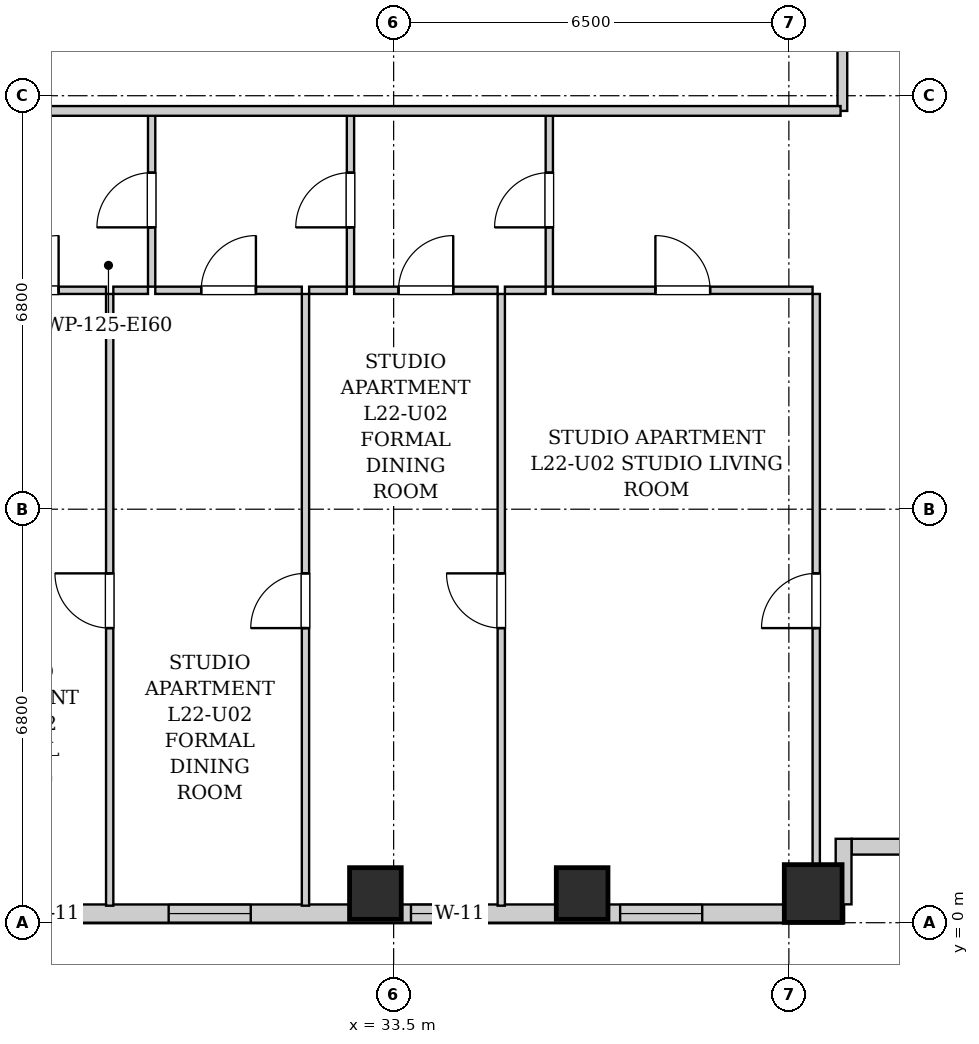
"""IFC4 building model, lengths in metres.
Left out: names, types, materials, properties, quantities, classifications, styles, units other than length and angle.
Written with IfcOpenShell. Run it as: python <this file> out.ifc"""

import sys

from ifc_helpers import new_model, si_unit, direction, frame, frame_2d, origin, origin_2d, place, context, subcontext, project, spatial, rectangle, extrude, element, fill, save


model = new_model("IFC4")
c1 = context("Model", 3, precision=1e-05, world=origin(), true_north=direction((0.0, 1.0)))
c2 = subcontext(c1, "Body", "Model", "MODEL_VIEW")
j1 = project(units=[si_unit("LENGTHUNIT", "METRE"), si_unit("PLANEANGLEUNIT", "RADIAN")], contexts=[c1])
p1 = place(None, origin())
s1 = spatial("IfcSite", under=j1, at=p1, CompositionType="ELEMENT")
p2 = place(p1, origin())
s2 = spatial("IfcBuilding", under=s1, at=p2, CompositionType="ELEMENT")
p3 = place(p2, frame((0.0, 0.0, 81.5)))
s3 = spatial("IfcBuildingStorey", under=s2, at=p3, CompositionType="ELEMENT", Elevation=81.5)
for number, where, z_axis, x_axis in (
    (1, (33.2, 0.48, 0.0), (0.0, 0.0, 1.0), (1.0, 0.0, 0.0)),
    (2, (36.6, 0.48, 0.0), (0.0, 0.0, 1.0), (1.0, 0.0, 0.0)),
):
    element("IfcColumn", number, at=place(p3, frame(where, z_axis=z_axis, x_axis=x_axis)), inside=s3, PredefinedType="COLUMN", context=c2, shape_type="SweptSolid", body=[
        extrude(rectangle(XDim=0.85, YDim=0.85, at=origin_2d()), origin(), (0.0, 0.0, 1.0), 3.2),
    ])
p4 = place(p3, frame((40.4, 0.48, 0.0), z_axis=(0.0, 0.0, 1.0), x_axis=(1.0, 0.0, 0.0)))
e3 = element("IfcColumn", 3, at=p4, inside=s3, PredefinedType="COLUMN", context=c2, shape_type="SweptSolid", body=[
    extrude(rectangle(XDim=0.95, YDim=0.95, at=origin_2d()), origin(), (0.0, 0.0, 1.0), 3.2),
])
p5 = place(p3, frame((40.9, 0.15, 0.0), z_axis=(0.0, 0.0, 1.0), x_axis=(-1.0, 0.0, 0.0)))
e4 = element("IfcWall", 4, at=p5, inside=s3, PredefinedType="SOLIDWALL", context=c2, shape_type="SweptSolid", body=[
    extrude(rectangle(XDim=22.5, YDim=0.3, at=frame_2d((11.25, 0.0))), origin(), (0.0, 0.0, 1.0), 2.94),
])
p6 = place(p5, frame((19.425, 0.0, 0.55)))
e5 = element("IfcOpeningElement", 5, at=p6, cuts=e4, PredefinedType="OPENING", context=c2, shape_type="SweptSolid", body=[
    extrude(rectangle(XDim=1.35, YDim=1.2, at=frame_2d((0.675, 0.6))), frame((0.0, 0.16, 0.0), z_axis=(0.0, -1.0, 0.0), x_axis=(1.0, 0.0, 0.0)), (0.0, 0.0, 1.0), 0.32),
])
p7 = place(p5, frame((12.55, 0.0, 0.55)))
e6 = element("IfcOpeningElement", 6, at=p7, cuts=e4, PredefinedType="OPENING", context=c2, shape_type="SweptSolid", body=[
    extrude(rectangle(XDim=0.85, YDim=1.2, at=frame_2d((0.425, 0.6))), frame((0.0, 0.16, 0.0), z_axis=(0.0, -1.0, 0.0), x_axis=(1.0, 0.0, 0.0)), (0.0, 0.0, 1.0), 0.32),
])
p8 = place(p5, frame((9.75, 0.0, 0.55)))
e7 = element("IfcOpeningElement", 7, at=p8, cuts=e4, PredefinedType="OPENING", context=c2, shape_type="SweptSolid", body=[
    extrude(rectangle(XDim=1.35, YDim=1.2, at=frame_2d((0.675, 0.6))), frame((0.0, 0.16, 0.0), z_axis=(0.0, -1.0, 0.0), x_axis=(1.0, 0.0, 0.0)), (0.0, 0.0, 1.0), 0.32),
])
p9 = place(p5, frame((6.265, 0.0, 0.55)))
e8 = element("IfcOpeningElement", 8, at=p9, cuts=e4, PredefinedType="OPENING", context=c2, shape_type="SweptSolid", body=[
    extrude(rectangle(XDim=0.85, YDim=1.2, at=frame_2d((0.425, 0.6))), frame((0.0, 0.16, 0.0), z_axis=(0.0, -1.0, 0.0), x_axis=(1.0, 0.0, 0.0)), (0.0, 0.0, 1.0), 0.32),
])
p10 = place(p5, frame((2.325, 0.0, 0.55)))
e9 = element("IfcOpeningElement", 9, at=p10, cuts=e4, PredefinedType="OPENING", context=c2, shape_type="SweptSolid", body=[
    extrude(rectangle(XDim=1.35, YDim=1.2, at=frame_2d((0.675, 0.6))), frame((0.0, 0.16, 0.0), z_axis=(0.0, -1.0, 0.0), x_axis=(1.0, 0.0, 0.0)), (0.0, 0.0, 1.0), 0.32),
])
p11 = place(p3, frame((42.018, 1.25, 0.0), z_axis=(0.0, 0.0, 1.0), x_axis=(-1.0, 0.0, 0.0)))
e10 = element("IfcWall", 10, at=p11, inside=s3, PredefinedType="SOLIDWALL", context=c2, shape_type="SweptSolid", body=[
    extrude(rectangle(XDim=0.986, YDim=0.26, at=frame_2d((0.493, 0.0))), origin(), (0.0, 0.0, 1.0), 2.94),
])
p12 = place(p3, frame((40.9, 1.38, 0.0), z_axis=(0.0, 0.0, 1.0), x_axis=(0.0, -1.0, 0.0)))
e11 = element("IfcWall", 11, at=p12, inside=s3, PredefinedType="SOLIDWALL", context=c2, shape_type="SweptSolid", body=[
    extrude(rectangle(XDim=1.078, YDim=0.26, at=frame_2d((0.539, 0.0))), origin(), (0.0, 0.0, 1.0), 2.94),
])
p13 = place(p3, frame((40.88, 13.35, 0.0), z_axis=(0.0, 0.0, 1.0), x_axis=(0.0, 1.0, 0.0)))
e12 = element("IfcWall", 12, at=p13, inside=s3, PredefinedType="PARTITIONING", context=c2, shape_type="SweptSolid", body=[
    extrude(rectangle(XDim=1.74, YDim=0.16, at=frame_2d((0.87, 0.0))), origin(), (0.0, 0.0, 1.0), 2.94),
])
p14 = place(p3, frame((29.52, 10.46, 0.0), z_axis=(0.0, 0.0, 1.0), x_axis=(0.0, 1.0, 0.0)))
e13 = element("IfcWall", 13, at=p14, inside=s3, PredefinedType="PARTITIONING", context=c2, shape_type="SweptSolid", body=[
    extrude(rectangle(XDim=2.85, YDim=0.12, at=frame_2d((1.425, 0.0))), origin(), (0.0, 0.0, 1.0), 2.94),
])
p15 = place(p14, frame((0.975, 0.0, 0.0)))
e14 = element("IfcOpeningElement", 14, at=p15, cuts=e13, PredefinedType="OPENING", context=c2, shape_type="SweptSolid", body=[
    extrude(rectangle(XDim=0.9, YDim=2.05, at=frame_2d((0.45, 1.025))), frame((0.0, 0.07, 0.0), z_axis=(0.0, -1.0, 0.0), x_axis=(1.0, 0.0, 0.0)), (0.0, 0.0, 1.0), 0.14),
])
p16 = place(p3, frame((26.31, 10.4, 0.0), z_axis=(0.0, 0.0, 1.0), x_axis=(1.0, 0.0, 0.0)))
e15 = element("IfcWall", 15, at=p16, inside=s3, PredefinedType="PARTITIONING", context=c2, shape_type="SweptSolid", body=[
    extrude(rectangle(XDim=2.46, YDim=0.12, at=frame_2d((1.23, 0.0))), origin(), (0.0, 0.0, 1.0), 2.94),
])
p17 = place(p16, frame((0.78, 0.0, 0.0)))
e16 = element("IfcOpeningElement", 16, at=p17, cuts=e15, PredefinedType="OPENING", context=c2, shape_type="SweptSolid", body=[
    extrude(rectangle(XDim=0.9, YDim=2.05, at=frame_2d((0.45, 1.025))), frame((0.0, 0.07, 0.0), z_axis=(0.0, -1.0, 0.0), x_axis=(1.0, 0.0, 0.0)), (0.0, 0.0, 1.0), 0.14),
])
p18 = place(p3, frame((28.89, 10.4, 0.0), z_axis=(0.0, 0.0, 1.0), x_axis=(1.0, 0.0, 0.0)))
e17 = element("IfcWall", 17, at=p18, inside=s3, PredefinedType="PARTITIONING", context=c2, shape_type="SweptSolid", body=[
    extrude(rectangle(XDim=0.57, YDim=0.12, at=frame_2d((0.285, 0.0))), origin(), (0.0, 0.0, 1.0), 2.94),
])
p19 = place(p3, frame((32.79, 10.46, 0.0), z_axis=(0.0, 0.0, 1.0), x_axis=(0.0, 1.0, 0.0)))
e18 = element("IfcWall", 18, at=p19, inside=s3, PredefinedType="PARTITIONING", context=c2, shape_type="SweptSolid", body=[
    extrude(rectangle(XDim=2.85, YDim=0.12, at=frame_2d((1.425, 0.0))), origin(), (0.0, 0.0, 1.0), 2.94),
])
p20 = place(p19, frame((0.975, 0.0, 0.0)))
e19 = element("IfcOpeningElement", 19, at=p20, cuts=e18, PredefinedType="OPENING", context=c2, shape_type="SweptSolid", body=[
    extrude(rectangle(XDim=0.9, YDim=2.05, at=frame_2d((0.45, 1.025))), frame((0.0, 0.07, 0.0), z_axis=(0.0, -1.0, 0.0), x_axis=(1.0, 0.0, 0.0)), (0.0, 0.0, 1.0), 0.14),
])
p21 = place(p3, frame((29.58, 10.4, 0.0), z_axis=(0.0, 0.0, 1.0), x_axis=(1.0, 0.0, 0.0)))
e20 = element("IfcWall", 20, at=p21, inside=s3, PredefinedType="PARTITIONING", context=c2, shape_type="SweptSolid", body=[
    extrude(rectangle(XDim=2.41, YDim=0.12, at=frame_2d((1.205, 0.0))), origin(), (0.0, 0.0, 1.0), 2.94),
])
p22 = place(p21, frame((0.755, 0.0, 0.0)))
e21 = element("IfcOpeningElement", 21, at=p22, cuts=e20, PredefinedType="OPENING", context=c2, shape_type="SweptSolid", body=[
    extrude(rectangle(XDim=0.9, YDim=2.05, at=frame_2d((0.45, 1.025))), frame((0.0, 0.07, 0.0), z_axis=(0.0, -1.0, 0.0), x_axis=(1.0, 0.0, 0.0)), (0.0, 0.0, 1.0), 0.14),
])
p23 = place(p3, frame((32.11, 10.4, 0.0), z_axis=(0.0, 0.0, 1.0), x_axis=(1.0, 0.0, 0.0)))
e22 = element("IfcWall", 22, at=p23, inside=s3, PredefinedType="PARTITIONING", context=c2, shape_type="SweptSolid", body=[
    extrude(rectangle(XDim=0.62, YDim=0.12, at=frame_2d((0.31, 0.0))), origin(), (0.0, 0.0, 1.0), 2.94),
])
p24 = place(p3, frame((36.06, 10.46, 0.0), z_axis=(0.0, 0.0, 1.0), x_axis=(0.0, 1.0, 0.0)))
e23 = element("IfcWall", 23, at=p24, inside=s3, PredefinedType="PARTITIONING", context=c2, shape_type="SweptSolid", body=[
    extrude(rectangle(XDim=2.85, YDim=0.12, at=frame_2d((1.425, 0.0))), origin(), (0.0, 0.0, 1.0), 2.94),
])
p25 = place(p24, frame((0.975, 0.0, 0.0)))
e24 = element("IfcOpeningElement", 24, at=p25, cuts=e23, PredefinedType="OPENING", context=c2, shape_type="SweptSolid", body=[
    extrude(rectangle(XDim=0.9, YDim=2.05, at=frame_2d((0.45, 1.025))), frame((0.0, 0.07, 0.0), z_axis=(0.0, -1.0, 0.0), x_axis=(1.0, 0.0, 0.0)), (0.0, 0.0, 1.0), 0.14),
])
p26 = place(p3, frame((32.85, 10.4, 0.0), z_axis=(0.0, 0.0, 1.0), x_axis=(1.0, 0.0, 0.0)))
e25 = element("IfcWall", 25, at=p26, inside=s3, PredefinedType="PARTITIONING", context=c2, shape_type="SweptSolid", body=[
    extrude(rectangle(XDim=2.36, YDim=0.12, at=frame_2d((1.18, 0.0))), origin(), (0.0, 0.0, 1.0), 2.94),
])
p27 = place(p26, frame((0.73, 0.0, 0.0)))
e26 = element("IfcOpeningElement", 26, at=p27, cuts=e25, PredefinedType="OPENING", context=c2, shape_type="SweptSolid", body=[
    extrude(rectangle(XDim=0.9, YDim=2.05, at=frame_2d((0.45, 1.025))), frame((0.0, 0.07, 0.0), z_axis=(0.0, -1.0, 0.0), x_axis=(1.0, 0.0, 0.0)), (0.0, 0.0, 1.0), 0.14),
])
p28 = place(p3, frame((35.33, 10.4, 0.0), z_axis=(0.0, 0.0, 1.0), x_axis=(1.0, 0.0, 0.0)))
e27 = element("IfcWall", 27, at=p28, inside=s3, PredefinedType="PARTITIONING", context=c2, shape_type="SweptSolid", body=[
    extrude(rectangle(XDim=0.67, YDim=0.12, at=frame_2d((0.335, 0.0))), origin(), (0.0, 0.0, 1.0), 2.94),
])
p29 = place(p3, frame((36.12, 10.4, 0.0), z_axis=(0.0, 0.0, 1.0), x_axis=(1.0, 0.0, 0.0)))
e28 = element("IfcWall", 28, at=p29, inside=s3, PredefinedType="PARTITIONING", context=c2, shape_type="SweptSolid", body=[
    extrude(rectangle(XDim=4.27, YDim=0.12, at=frame_2d((2.135, 0.0))), origin(), (0.0, 0.0, 1.0), 2.94),
])
p30 = place(p29, frame((1.685, 0.0, 0.0)))
e29 = element("IfcOpeningElement", 29, at=p30, cuts=e28, PredefinedType="OPENING", context=c2, shape_type="SweptSolid", body=[
    extrude(rectangle(XDim=0.9, YDim=2.05, at=frame_2d((0.45, 1.025))), frame((0.0, 0.07, 0.0), z_axis=(0.0, -1.0, 0.0), x_axis=(1.0, 0.0, 0.0)), (0.0, 0.0, 1.0), 0.14),
])
p31 = place(p3, frame((28.83, 0.28, 0.0), z_axis=(0.0, 0.0, 1.0), x_axis=(0.0, 1.0, 0.0)))
e30 = element("IfcWall", 30, at=p31, inside=s3, PredefinedType="PARTITIONING", context=c2, shape_type="SweptSolid", body=[
    extrude(rectangle(XDim=10.06, YDim=0.12, at=frame_2d((5.03, 0.0))), origin(), (0.0, 0.0, 1.0), 2.94),
])
p32 = place(p31, frame((4.565, 0.0, 0.0)))
e31 = element("IfcOpeningElement", 31, at=p32, cuts=e30, PredefinedType="OPENING", context=c2, shape_type="SweptSolid", body=[
    extrude(rectangle(XDim=0.9, YDim=2.05, at=frame_2d((0.45, 1.025))), frame((0.0, 0.07, 0.0), z_axis=(0.0, -1.0, 0.0), x_axis=(1.0, 0.0, 0.0)), (0.0, 0.0, 1.0), 0.14),
])
p33 = place(p3, frame((32.05, 0.28, 0.0), z_axis=(0.0, 0.0, 1.0), x_axis=(0.0, 1.0, 0.0)))
e32 = element("IfcWall", 32, at=p33, inside=s3, PredefinedType="PARTITIONING", context=c2, shape_type="SweptSolid", body=[
    extrude(rectangle(XDim=10.06, YDim=0.12, at=frame_2d((5.03, 0.0))), origin(), (0.0, 0.0, 1.0), 2.94),
])
p34 = place(p33, frame((4.565, 0.0, 0.0)))
e33 = element("IfcOpeningElement", 33, at=p34, cuts=e32, PredefinedType="OPENING", context=c2, shape_type="SweptSolid", body=[
    extrude(rectangle(XDim=0.9, YDim=2.05, at=frame_2d((0.45, 1.025))), frame((0.0, 0.07, 0.0), z_axis=(0.0, -1.0, 0.0), x_axis=(1.0, 0.0, 0.0)), (0.0, 0.0, 1.0), 0.14),
])
p35 = place(p3, frame((35.27, 0.28, 0.0), z_axis=(0.0, 0.0, 1.0), x_axis=(0.0, 1.0, 0.0)))
e34 = element("IfcWall", 34, at=p35, inside=s3, PredefinedType="PARTITIONING", context=c2, shape_type="SweptSolid", body=[
    extrude(rectangle(XDim=10.06, YDim=0.12, at=frame_2d((5.03, 0.0))), origin(), (0.0, 0.0, 1.0), 2.94),
])
p36 = place(p35, frame((4.565, 0.0, 0.0)))
e35 = element("IfcOpeningElement", 35, at=p36, cuts=e34, PredefinedType="OPENING", context=c2, shape_type="SweptSolid", body=[
    extrude(rectangle(XDim=0.9, YDim=2.05, at=frame_2d((0.45, 1.025))), frame((0.0, 0.07, 0.0), z_axis=(0.0, -1.0, 0.0), x_axis=(1.0, 0.0, 0.0)), (0.0, 0.0, 1.0), 0.14),
])
p37 = place(p3, frame((40.45, 0.28, 0.0), z_axis=(0.0, 0.0, 1.0), x_axis=(0.0, 1.0, 0.0)))
e36 = element("IfcWall", 36, at=p37, inside=s3, PredefinedType="PARTITIONING", context=c2, shape_type="SweptSolid", body=[
    extrude(rectangle(XDim=10.06, YDim=0.12, at=frame_2d((5.03, 0.0))), origin(), (0.0, 0.0, 1.0), 2.94),
])
p38 = place(p37, frame((4.565, 0.0, 0.0)))
e37 = element("IfcOpeningElement", 37, at=p38, cuts=e36, PredefinedType="OPENING", context=c2, shape_type="SweptSolid", body=[
    extrude(rectangle(XDim=0.9, YDim=2.05, at=frame_2d((0.45, 1.025))), frame((0.0, 0.07, 0.0), z_axis=(0.0, -1.0, 0.0), x_axis=(1.0, 0.0, 0.0)), (0.0, 0.0, 1.0), 0.14),
])
p39 = place(p3, frame((10.05, 13.35, 0.0), z_axis=(0.0, 0.0, 1.0), x_axis=(1.0, 0.0, 0.0)))
e38 = element("IfcWall", 38, at=p39, inside=s3, PredefinedType="PARTITIONING", context=c2, shape_type="SweptSolid", body=[
    extrude(rectangle(XDim=30.8, YDim=0.16, at=frame_2d((15.4, 0.0))), origin(), (0.0, 0.0, 1.0), 2.94),
])
p40 = place(p39, frame((3.8, 0.0, 0.0)))
e39 = element("IfcOpeningElement", 39, at=p40, cuts=e38, PredefinedType="OPENING", context=c2, shape_type="SweptSolid", body=[
    extrude(rectangle(XDim=0.95, YDim=2.1, at=frame_2d((0.475, 1.05))), frame((0.0, 0.09, 0.0), z_axis=(0.0, -1.0, 0.0), x_axis=(1.0, 0.0, 0.0)), (0.0, 0.0, 1.0), 0.18),
])
p41 = place(p39, frame((13.445, 0.0, 0.0)))
e40 = element("IfcOpeningElement", 40, at=p41, cuts=e38, PredefinedType="OPENING", context=c2, shape_type="SweptSolid", body=[
    extrude(rectangle(XDim=0.95, YDim=2.1, at=frame_2d((0.475, 1.05))), frame((0.0, 0.09, 0.0), z_axis=(0.0, -1.0, 0.0), x_axis=(1.0, 0.0, 0.0)), (0.0, 0.0, 1.0), 0.18),
])
p42 = place(p15, origin())
e41 = element("IfcDoor", 41, at=p42, inside=s3, OperationType="SINGLE_SWING_LEFT", PredefinedType="DOOR", context=c2, shape_type="SweptSolid", body=[
    extrude(rectangle(XDim=0.9, YDim=2.05, at=frame_2d((0.45, 1.025))), frame((0.0, 0.025, 0.0), z_axis=(0.0, -1.0, 0.0), x_axis=(1.0, 0.0, 0.0)), (0.0, 0.0, 1.0), 0.05),
])
fill(e14, e41)
p43 = place(p17, origin())
e42 = element("IfcDoor", 42, at=p43, inside=s3, OperationType="SINGLE_SWING_RIGHT", PredefinedType="DOOR", context=c2, shape_type="SweptSolid", body=[
    extrude(rectangle(XDim=0.9, YDim=2.05, at=frame_2d((0.45, 1.025))), frame((0.0, 0.025, 0.0), z_axis=(0.0, -1.0, 0.0), x_axis=(1.0, 0.0, 0.0)), (0.0, 0.0, 1.0), 0.05),
])
fill(e16, e42)
p44 = place(p20, origin())
e43 = element("IfcDoor", 43, at=p44, inside=s3, OperationType="SINGLE_SWING_LEFT", PredefinedType="DOOR", context=c2, shape_type="SweptSolid", body=[
    extrude(rectangle(XDim=0.9, YDim=2.05, at=frame_2d((0.45, 1.025))), frame((0.0, 0.025, 0.0), z_axis=(0.0, -1.0, 0.0), x_axis=(1.0, 0.0, 0.0)), (0.0, 0.0, 1.0), 0.05),
])
fill(e19, e43)
p45 = place(p22, origin())
e44 = element("IfcDoor", 44, at=p45, inside=s3, OperationType="SINGLE_SWING_RIGHT", PredefinedType="DOOR", context=c2, shape_type="SweptSolid", body=[
    extrude(rectangle(XDim=0.9, YDim=2.05, at=frame_2d((0.45, 1.025))), frame((0.0, 0.025, 0.0), z_axis=(0.0, -1.0, 0.0), x_axis=(1.0, 0.0, 0.0)), (0.0, 0.0, 1.0), 0.05),
])
fill(e21, e44)
p46 = place(p25, origin())
e45 = element("IfcDoor", 45, at=p46, inside=s3, OperationType="SINGLE_SWING_LEFT", PredefinedType="DOOR", context=c2, shape_type="SweptSolid", body=[
    extrude(rectangle(XDim=0.9, YDim=2.05, at=frame_2d((0.45, 1.025))), frame((0.0, 0.025, 0.0), z_axis=(0.0, -1.0, 0.0), x_axis=(1.0, 0.0, 0.0)), (0.0, 0.0, 1.0), 0.05),
])
fill(e24, e45)
p47 = place(p27, origin())
e46 = element("IfcDoor", 46, at=p47, inside=s3, OperationType="SINGLE_SWING_RIGHT", PredefinedType="DOOR", context=c2, shape_type="SweptSolid", body=[
    extrude(rectangle(XDim=0.9, YDim=2.05, at=frame_2d((0.45, 1.025))), frame((0.0, 0.025, 0.0), z_axis=(0.0, -1.0, 0.0), x_axis=(1.0, 0.0, 0.0)), (0.0, 0.0, 1.0), 0.05),
])
fill(e26, e46)
p48 = place(p30, origin())
e47 = element("IfcDoor", 47, at=p48, inside=s3, OperationType="SINGLE_SWING_LEFT", PredefinedType="DOOR", context=c2, shape_type="SweptSolid", body=[
    extrude(rectangle(XDim=0.9, YDim=2.05, at=frame_2d((0.45, 1.025))), frame((0.0, 0.025, 0.0), z_axis=(0.0, -1.0, 0.0), x_axis=(1.0, 0.0, 0.0)), (0.0, 0.0, 1.0), 0.05),
])
fill(e29, e47)
p49 = place(p32, origin())
e48 = element("IfcDoor", 48, at=p49, inside=s3, OperationType="SINGLE_SWING_RIGHT", PredefinedType="DOOR", context=c2, shape_type="SweptSolid", body=[
    extrude(rectangle(XDim=0.9, YDim=2.05, at=frame_2d((0.45, 1.025))), frame((0.0, 0.025, 0.0), z_axis=(0.0, -1.0, 0.0), x_axis=(1.0, 0.0, 0.0)), (0.0, 0.0, 1.0), 0.05),
])
fill(e31, e48)
p50 = place(p34, origin())
e49 = element("IfcDoor", 49, at=p50, inside=s3, OperationType="SINGLE_SWING_LEFT", PredefinedType="DOOR", context=c2, shape_type="SweptSolid", body=[
    extrude(rectangle(XDim=0.9, YDim=2.05, at=frame_2d((0.45, 1.025))), frame((0.0, 0.025, 0.0), z_axis=(0.0, -1.0, 0.0), x_axis=(1.0, 0.0, 0.0)), (0.0, 0.0, 1.0), 0.05),
])
fill(e33, e49)
p51 = place(p36, origin())
e50 = element("IfcDoor", 50, at=p51, inside=s3, OperationType="SINGLE_SWING_RIGHT", PredefinedType="DOOR", context=c2, shape_type="SweptSolid", body=[
    extrude(rectangle(XDim=0.9, YDim=2.05, at=frame_2d((0.45, 1.025))), frame((0.0, 0.025, 0.0), z_axis=(0.0, -1.0, 0.0), x_axis=(1.0, 0.0, 0.0)), (0.0, 0.0, 1.0), 0.05),
])
fill(e35, e50)
p52 = place(p38, origin())
e51 = element("IfcDoor", 51, at=p52, inside=s3, OperationType="SINGLE_SWING_LEFT", PredefinedType="DOOR", context=c2, shape_type="SweptSolid", body=[
    extrude(rectangle(XDim=0.9, YDim=2.05, at=frame_2d((0.45, 1.025))), frame((0.0, 0.025, 0.0), z_axis=(0.0, -1.0, 0.0), x_axis=(1.0, 0.0, 0.0)), (0.0, 0.0, 1.0), 0.05),
])
fill(e37, e51)
p53 = place(p7, origin())
e52 = element("IfcWindow", 52, at=p53, inside=s3, PartitioningType="SINGLE_PANEL", PredefinedType="WINDOW", context=c2, shape_type="SweptSolid", body=[
    extrude(rectangle(XDim=0.85, YDim=1.2, at=frame_2d((0.425, 0.6))), frame((0.0, 0.03, 0.0), z_axis=(0.0, -1.0, 0.0), x_axis=(1.0, 0.0, 0.0)), (0.0, 0.0, 1.0), 0.06),
])
fill(e6, e52)
p54 = place(p8, origin())
e53 = element("IfcWindow", 53, at=p54, inside=s3, PartitioningType="SINGLE_PANEL", PredefinedType="WINDOW", context=c2, shape_type="SweptSolid", body=[
    extrude(rectangle(XDim=1.35, YDim=1.2, at=frame_2d((0.675, 0.6))), frame((0.0, 0.03, 0.0), z_axis=(0.0, -1.0, 0.0), x_axis=(1.0, 0.0, 0.0)), (0.0, 0.0, 1.0), 0.06),
])
fill(e7, e53)
p55 = place(p9, origin())
e54 = element("IfcWindow", 54, at=p55, inside=s3, PartitioningType="SINGLE_PANEL", PredefinedType="WINDOW", context=c2, shape_type="SweptSolid", body=[
    extrude(rectangle(XDim=0.85, YDim=1.2, at=frame_2d((0.425, 0.6))), frame((0.0, 0.03, 0.0), z_axis=(0.0, -1.0, 0.0), x_axis=(1.0, 0.0, 0.0)), (0.0, 0.0, 1.0), 0.06),
])
fill(e8, e54)
p56 = place(p10, origin())
e55 = element("IfcWindow", 55, at=p56, inside=s3, PartitioningType="SINGLE_PANEL", PredefinedType="WINDOW", context=c2, shape_type="SweptSolid", body=[
    extrude(rectangle(XDim=1.35, YDim=1.2, at=frame_2d((0.675, 0.6))), frame((0.0, 0.03, 0.0), z_axis=(0.0, -1.0, 0.0), x_axis=(1.0, 0.0, 0.0)), (0.0, 0.0, 1.0), 0.06),
])
fill(e9, e55)
save(model, sys.argv[1])
